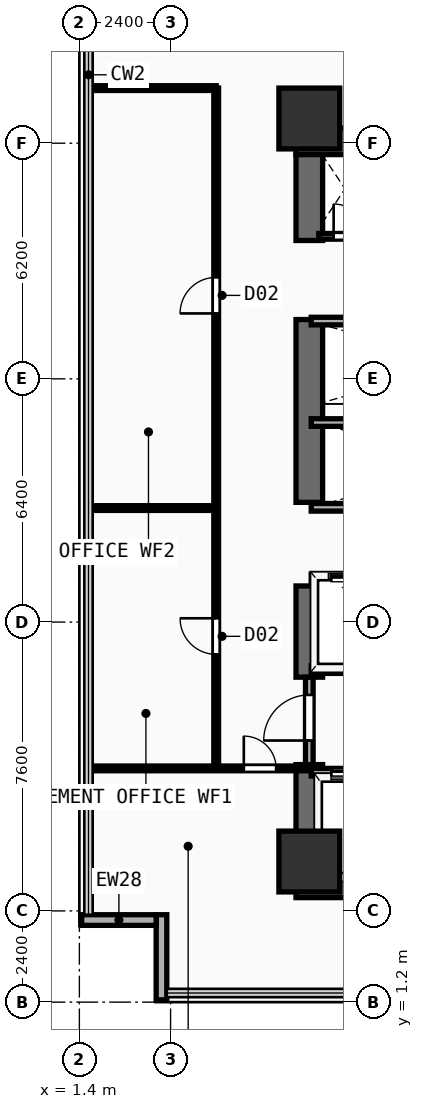
"""IFC4 building model, lengths in metres.
Left out: names, types, materials, properties, quantities, classifications, styles, units other than length and angle.
Written with IfcOpenShell. Run it as: python <this file> out.ifc"""

import sys

from ifc_helpers import new_model, si_unit, direction, frame, frame_2d, origin, origin_2d, place, context, subcontext, project, spatial, rectangle, extrude, element, fill, save


model = new_model("IFC4")
c1 = context("Model", 3, precision=1e-05, world=origin(), true_north=direction((0.0, 1.0)))
c2 = subcontext(c1, "Body", "Model", "MODEL_VIEW")
j1 = project(units=[si_unit("LENGTHUNIT", "METRE"), si_unit("PLANEANGLEUNIT", "RADIAN")], contexts=[c1])
p1 = place(None, origin())
s1 = spatial("IfcSite", under=j1, at=p1, CompositionType="ELEMENT")
p2 = place(p1, origin())
s2 = spatial("IfcBuilding", under=s1, at=p2, CompositionType="ELEMENT")
p3 = place(p2, frame((0.0, 0.0, 56.2)))
s3 = spatial("IfcBuildingStorey", under=s2, at=p3, CompositionType="ELEMENT", Elevation=56.2)
for number, where, z_axis, x_axis in (
    (1, (7.1, 4.3, 0.0), (0.0, 0.0, 1.0), (1.0, 0.0, 0.0)),
    (2, (7.1, 23.85, 0.0), (0.0, 0.0, 1.0), (1.0, 0.0, 0.0)),
):
    element("IfcWall", number, at=place(p3, frame(where, z_axis=z_axis, x_axis=x_axis)), inside=s3, PredefinedType="SHEAR", context=c2, shape_type="SweptSolid", body=[
        extrude(rectangle(XDim=14.05, YDim=0.7, at=frame_2d((7.025, 0.0))), origin(), (0.0, 0.0, 1.0), 3.54),
    ])
p4 = place(p3, frame((7.45, 4.65, 0.0), z_axis=(0.0, 0.0, 1.0), x_axis=(0.0, 1.0, 0.0)))
e3 = element("IfcWall", 3, at=p4, inside=s3, PredefinedType="SHEAR", context=c2, shape_type="SweptSolid", body=[
    extrude(rectangle(XDim=2.8, YDim=0.7, at=frame_2d((1.4, 0.0))), origin(), (0.0, 0.0, 1.0), 3.54),
])
p5 = place(p3, frame((7.45, 9.75, 0.0), z_axis=(0.0, 0.0, 1.0), x_axis=(0.0, 1.0, 0.0)))
e4 = element("IfcWall", 4, at=p5, inside=s3, PredefinedType="SHEAR", context=c2, shape_type="SweptSolid", body=[
    extrude(rectangle(XDim=2.4, YDim=0.7, at=frame_2d((1.2, 0.0))), origin(), (0.0, 0.0, 1.0), 3.54),
])
p6 = place(p3, frame((7.45, 14.35, 0.0), z_axis=(0.0, 0.0, 1.0), x_axis=(0.0, 1.0, 0.0)))
e5 = element("IfcWall", 5, at=p6, inside=s3, PredefinedType="SHEAR", context=c2, shape_type="SweptSolid", body=[
    extrude(rectangle(XDim=4.81, YDim=0.7, at=frame_2d((2.405, 0.0))), origin(), (0.0, 0.0, 1.0), 3.54),
])
p7 = place(p3, frame((7.45, 21.24, 0.0), z_axis=(0.0, 0.0, 1.0), x_axis=(0.0, 1.0, 0.0)))
e6 = element("IfcWall", 6, at=p7, inside=s3, PredefinedType="SHEAR", context=c2, shape_type="SweptSolid", body=[
    extrude(rectangle(XDim=2.26, YDim=0.7, at=frame_2d((1.13, 0.0))), origin(), (0.0, 0.0, 1.0), 3.54),
])
for number, where, z_axis, x_axis in (
    (7, (7.45, 4.9, 0.0), (0.0, 0.0, 1.0), (1.0, 0.0, 0.0)),
    (8, (7.45, 24.45, 0.0), (0.0, 0.0, 1.0), (1.0, 0.0, 0.0)),
):
    element("IfcColumn", number, at=place(p3, frame(where, z_axis=z_axis, x_axis=x_axis)), inside=s3, PredefinedType="COLUMN", context=c2, shape_type="SweptSolid", body=[
        extrude(rectangle(XDim=1.6, YDim=1.6, at=origin_2d()), origin(), (0.0, 0.0, 1.0), 3.54),
    ])
p8 = place(p3, frame((3.56, 1.26, 0.0), z_axis=(0.0, 0.0, 1.0), x_axis=(0.0, 1.0, 0.0)))
e9 = element("IfcWall", 9, at=p8, inside=s3, PredefinedType="SOLIDWALL", context=c2, shape_type="SweptSolid", body=[
    extrude(rectangle(XDim=2.24, YDim=0.28, at=frame_2d((1.12, 0.0))), origin(), (0.0, 0.0, 1.0), 3.54),
])
p9 = place(p3, frame((1.46, 3.36, 0.0), z_axis=(0.0, 0.0, 1.0), x_axis=(1.0, 0.0, 0.0)))
e10 = element("IfcWall", 10, at=p9, inside=s3, PredefinedType="SOLIDWALL", context=c2, shape_type="SweptSolid", body=[
    extrude(rectangle(XDim=1.96, YDim=0.28, at=frame_2d((0.98, 0.0))), origin(), (0.0, 0.0, 1.0), 3.54),
])
p10 = place(p3, frame((7.5, 7.25, 0.0), z_axis=(0.0, 0.0, 1.0), x_axis=(1.0, 0.0, 0.0)))
e11 = element("IfcWall", 11, at=p10, inside=s3, PredefinedType="PARTITIONING", context=c2, shape_type="SweptSolid", body=[
    extrude(rectangle(XDim=8.35, YDim=0.2, at=frame_2d((4.175, 0.0))), origin(), (0.0, 0.0, 1.0), 3.54),
])
p11 = place(p10, frame((0.53, 0.0, 0.0)))
e12 = element("IfcOpeningElement", 12, at=p11, cuts=e11, PredefinedType="OPENING", context=c2, shape_type="SweptSolid", body=[
    extrude(rectangle(XDim=1.1, YDim=2.2, at=frame_2d((0.55, 1.1))), frame((0.0, 0.11, 0.0), z_axis=(0.0, -1.0, 0.0), x_axis=(1.0, 0.0, 0.0)), (0.0, 0.0, 1.0), 0.22),
])
p12 = place(p10, frame((2.37, 0.0, 0.0)))
e13 = element("IfcOpeningElement", 13, at=p12, cuts=e11, PredefinedType="OPENING", context=c2, shape_type="SweptSolid", body=[
    extrude(rectangle(XDim=1.1, YDim=2.2, at=frame_2d((0.55, 1.1))), frame((0.0, 0.11, 0.0), z_axis=(0.0, -1.0, 0.0), x_axis=(1.0, 0.0, 0.0)), (0.0, 0.0, 1.0), 0.22),
])
p13 = place(p10, frame((4.33, 0.0, 0.0)))
e14 = element("IfcOpeningElement", 14, at=p13, cuts=e11, PredefinedType="OPENING", context=c2, shape_type="SweptSolid", body=[
    extrude(rectangle(XDim=1.1, YDim=2.2, at=frame_2d((0.55, 1.1))), frame((0.0, 0.11, 0.0), z_axis=(0.0, -1.0, 0.0), x_axis=(1.0, 0.0, 0.0)), (0.0, 0.0, 1.0), 0.22),
])
p14 = place(p10, frame((6.5, 0.0, 0.0)))
e15 = element("IfcOpeningElement", 15, at=p14, cuts=e11, PredefinedType="OPENING", context=c2, shape_type="SweptSolid", body=[
    extrude(rectangle(XDim=1.1, YDim=2.2, at=frame_2d((0.55, 1.1))), frame((0.0, 0.11, 0.0), z_axis=(0.0, -1.0, 0.0), x_axis=(1.0, 0.0, 0.0)), (0.0, 0.0, 1.0), 0.22),
])
p15 = place(p3, frame((7.5, 9.95, 0.0), z_axis=(0.0, 0.0, 1.0), x_axis=(1.0, 0.0, 0.0)))
e16 = element("IfcWall", 16, at=p15, inside=s3, PredefinedType="PARTITIONING", context=c2, shape_type="SweptSolid", body=[
    extrude(rectangle(XDim=8.35, YDim=0.2, at=frame_2d((4.175, 0.0))), origin(), (0.0, 0.0, 1.0), 3.54),
])
p16 = place(p3, frame((7.45, 7.45, 0.0), z_axis=(0.0, 0.0, 1.0), x_axis=(0.0, 1.0, 0.0)))
e17 = element("IfcWall", 17, at=p16, inside=s3, PredefinedType="PARTITIONING", context=c2, shape_type="SweptSolid", body=[
    extrude(rectangle(XDim=2.3, YDim=0.2, at=frame_2d((1.15, 0.0))), origin(), (0.0, 0.0, 1.0), 2.52),
])
p17 = place(p16, frame((0.633, 0.0, 0.0)))
e18 = element("IfcOpeningElement", 18, at=p17, cuts=e17, PredefinedType="OPENING", context=c2, shape_type="SweptSolid", body=[
    extrude(rectangle(XDim=1.2, YDim=2.25, at=frame_2d((0.6, 1.125))), frame((0.0, 0.11, 0.0), z_axis=(0.0, -1.0, 0.0), x_axis=(1.0, 0.0, 0.0)), (0.0, 0.0, 1.0), 0.22),
])
p18 = place(p3, frame((7.5, 12.36, 0.0), z_axis=(0.0, 0.0, 1.0), x_axis=(1.0, 0.0, 0.0)))
e19 = element("IfcWall", 19, at=p18, inside=s3, PredefinedType="PARTITIONING", context=c2, shape_type="SweptSolid", body=[
    extrude(rectangle(XDim=7.85, YDim=0.2, at=frame_2d((3.925, 0.0))), origin(), (0.0, 0.0, 1.0), 3.54),
])
p19 = place(p18, frame((0.53, 0.0, 0.0)))
e20 = element("IfcOpeningElement", 20, at=p19, cuts=e19, PredefinedType="OPENING", context=c2, shape_type="SweptSolid", body=[
    extrude(rectangle(XDim=1.1, YDim=2.2, at=frame_2d((0.55, 1.1))), frame((0.0, 0.11, 0.0), z_axis=(0.0, -1.0, 0.0), x_axis=(1.0, 0.0, 0.0)), (0.0, 0.0, 1.0), 0.22),
])
p20 = place(p18, frame((2.42, 0.0, 0.0)))
e21 = element("IfcOpeningElement", 21, at=p20, cuts=e19, PredefinedType="OPENING", context=c2, shape_type="SweptSolid", body=[
    extrude(rectangle(XDim=1.1, YDim=2.2, at=frame_2d((0.55, 1.1))), frame((0.0, 0.11, 0.0), z_axis=(0.0, -1.0, 0.0), x_axis=(1.0, 0.0, 0.0)), (0.0, 0.0, 1.0), 0.22),
])
p21 = place(p18, frame((4.31, 0.0, 0.0)))
e22 = element("IfcOpeningElement", 22, at=p21, cuts=e19, PredefinedType="OPENING", context=c2, shape_type="SweptSolid", body=[
    extrude(rectangle(XDim=1.1, YDim=2.2, at=frame_2d((0.55, 1.1))), frame((0.0, 0.11, 0.0), z_axis=(0.0, -1.0, 0.0), x_axis=(1.0, 0.0, 0.0)), (0.0, 0.0, 1.0), 0.22),
])
p22 = place(p18, frame((6.2, 0.0, 0.0)))
e23 = element("IfcOpeningElement", 23, at=p22, cuts=e19, PredefinedType="OPENING", context=c2, shape_type="SweptSolid", body=[
    extrude(rectangle(XDim=1.1, YDim=2.2, at=frame_2d((0.55, 1.1))), frame((0.0, 0.11, 0.0), z_axis=(0.0, -1.0, 0.0), x_axis=(1.0, 0.0, 0.0)), (0.0, 0.0, 1.0), 0.22),
])
for number, where, z_axis, x_axis in (
    (24, (7.5, 14.22, 0.0), (0.0, 0.0, 1.0), (1.0, 0.0, 0.0)),
    (25, (7.5, 16.45, 0.0), (0.0, 0.0, 1.0), (1.0, 0.0, 0.0)),
    (26, (7.5, 19.12, 0.0), (0.0, 0.0, 1.0), (1.0, 0.0, 0.0)),
):
    element("IfcWall", number, at=place(p3, frame(where, z_axis=z_axis, x_axis=x_axis)), inside=s3, PredefinedType="PARTITIONING", context=c2, shape_type="SweptSolid", body=[
        extrude(rectangle(XDim=7.85, YDim=0.2, at=frame_2d((3.925, 0.0))), origin(), (0.0, 0.0, 1.0), 3.54),
    ])
p23 = place(p3, frame((7.7, 21.35, 0.0), z_axis=(0.0, 0.0, 1.0), x_axis=(1.0, 0.0, 0.0)))
e27 = element("IfcWall", 27, at=p23, inside=s3, PredefinedType="PARTITIONING", context=c2, shape_type="SweptSolid", body=[
    extrude(rectangle(XDim=1.55, YDim=0.15, at=frame_2d((0.775, 0.0))), origin(), (0.0, 0.0, 1.0), 3.54),
])
p24 = place(p23, frame((0.39, 0.0, 0.0)))
e28 = element("IfcOpeningElement", 28, at=p24, cuts=e27, PredefinedType="OPENING", context=c2, shape_type="SweptSolid", body=[
    extrude(rectangle(XDim=0.85, YDim=2.15, at=frame_2d((0.425, 1.075))), frame((0.0, 0.085, 0.0), z_axis=(0.0, -1.0, 0.0), x_axis=(1.0, 0.0, 0.0)), (0.0, 0.0, 1.0), 0.17),
])
p25 = place(p3, frame((1.64, 7.35, 0.0), z_axis=(0.0, 0.0, 1.0), x_axis=(1.0, 0.0, 0.0)))
e29 = element("IfcWall", 29, at=p25, inside=s3, PredefinedType="PARTITIONING", context=c2, shape_type="SweptSolid", body=[
    extrude(rectangle(XDim=5.76, YDim=0.125, at=frame_2d((2.88, 0.0))), origin(), (0.0, 0.0, 1.0), 3.54),
])
p26 = place(p25, frame((4.087, 0.0, 0.0)))
e30 = element("IfcOpeningElement", 30, at=p26, cuts=e29, PredefinedType="OPENING", context=c2, shape_type="SweptSolid", body=[
    extrude(rectangle(XDim=0.85, YDim=2.15, at=frame_2d((0.425, 1.075))), frame((0.0, 0.073, 0.0), z_axis=(0.0, -1.0, 0.0), x_axis=(1.0, 0.0, 0.0)), (0.0, 0.0, 1.0), 0.145),
])
p27 = place(p3, frame((5.0, 7.5, 0.0), z_axis=(0.0, 0.0, 1.0), x_axis=(0.0, 1.0, 0.0)))
e31 = element("IfcWall", 31, at=p27, inside=s3, PredefinedType="PARTITIONING", context=c2, shape_type="SweptSolid", body=[
    extrude(rectangle(XDim=17.75, YDim=0.125, at=frame_2d((8.875, 0.0))), origin(), (0.0, 0.0, 1.0), 3.54),
])
p28 = place(p27, frame((2.85, 0.0, 0.0)))
e32 = element("IfcOpeningElement", 32, at=p28, cuts=e31, PredefinedType="OPENING", context=c2, shape_type="SweptSolid", body=[
    extrude(rectangle(XDim=0.95, YDim=2.15, at=frame_2d((0.475, 1.075))), frame((0.0, 0.073, 0.0), z_axis=(0.0, -1.0, 0.0), x_axis=(1.0, 0.0, 0.0)), (0.0, 0.0, 1.0), 0.145),
])
p29 = place(p27, frame((11.821, 0.0, 0.0)))
e33 = element("IfcOpeningElement", 33, at=p29, cuts=e31, PredefinedType="OPENING", context=c2, shape_type="SweptSolid", body=[
    extrude(rectangle(XDim=0.95, YDim=2.15, at=frame_2d((0.475, 1.075))), frame((0.0, 0.073, 0.0), z_axis=(0.0, -1.0, 0.0), x_axis=(1.0, 0.0, 0.0)), (0.0, 0.0, 1.0), 0.145),
])
for number, where, z_axis, x_axis in (
    (34, (1.64, 25.25, 0.0), (0.0, 0.0, 1.0), (1.0, 0.0, 0.0)),
    (35, (1.64, 14.2, 0.0), (0.0, 0.0, 1.0), (1.0, 0.0, 0.0)),
):
    element("IfcWall", number, at=place(p3, frame(where, z_axis=z_axis, x_axis=x_axis)), inside=s3, PredefinedType="PARTITIONING", context=c2, shape_type="SweptSolid", body=[
        extrude(rectangle(XDim=3.36, YDim=0.125, at=frame_2d((1.68, 0.0))), origin(), (0.0, 0.0, 1.0), 3.54),
    ])
p30 = place(p11, origin())
e36 = element("IfcDoor", 36, at=p30, inside=s3, OperationType="SLIDING_TO_LEFT", PredefinedType="DOOR", context=c2, shape_type="SweptSolid", body=[
    extrude(rectangle(XDim=1.1, YDim=2.2, at=frame_2d((0.55, 1.1))), frame((0.0, 0.025, 0.0), z_axis=(0.0, -1.0, 0.0), x_axis=(1.0, 0.0, 0.0)), (0.0, 0.0, 1.0), 0.05),
])
fill(e12, e36)
p31 = place(p17, frame((1.2, 0.0, 0.0), z_axis=(0.0, 0.0, 1.0), x_axis=(-1.0, 0.0, 0.0)))
e37 = element("IfcDoor", 37, at=p31, inside=s3, OperationType="SINGLE_SWING_RIGHT", PredefinedType="DOOR", context=c2, shape_type="SweptSolid", body=[
    extrude(rectangle(XDim=1.2, YDim=2.25, at=frame_2d((0.6, 1.125))), frame((0.0, 0.025, 0.0), z_axis=(0.0, -1.0, 0.0), x_axis=(1.0, 0.0, 0.0)), (0.0, 0.0, 1.0), 0.05),
])
fill(e18, e37)
p32 = place(p19, origin())
e38 = element("IfcDoor", 38, at=p32, inside=s3, OperationType="SLIDING_TO_LEFT", PredefinedType="DOOR", context=c2, shape_type="SweptSolid", body=[
    extrude(rectangle(XDim=1.1, YDim=2.2, at=frame_2d((0.55, 1.1))), frame((0.0, 0.025, 0.0), z_axis=(0.0, -1.0, 0.0), x_axis=(1.0, 0.0, 0.0)), (0.0, 0.0, 1.0), 0.05),
])
fill(e20, e38)
p33 = place(p24, origin())
e39 = element("IfcDoor", 39, at=p33, inside=s3, OperationType="SINGLE_SWING_LEFT", PredefinedType="DOOR", context=c2, shape_type="SweptSolid", body=[
    extrude(rectangle(XDim=0.85, YDim=2.15, at=frame_2d((0.425, 1.075))), frame((0.0, 0.025, 0.0), z_axis=(0.0, -1.0, 0.0), x_axis=(1.0, 0.0, 0.0)), (0.0, 0.0, 1.0), 0.05),
])
fill(e28, e39)
p34 = place(p26, origin())
e40 = element("IfcDoor", 40, at=p34, inside=s3, OperationType="SINGLE_SWING_LEFT", PredefinedType="DOOR", context=c2, shape_type="SweptSolid", body=[
    extrude(rectangle(XDim=0.85, YDim=2.15, at=frame_2d((0.425, 1.075))), frame((0.0, 0.025, 0.0), z_axis=(0.0, -1.0, 0.0), x_axis=(1.0, 0.0, 0.0)), (0.0, 0.0, 1.0), 0.05),
])
fill(e30, e40)
p35 = place(p28, origin())
e41 = element("IfcDoor", 41, at=p35, inside=s3, OperationType="SINGLE_SWING_RIGHT", PredefinedType="DOOR", context=c2, shape_type="SweptSolid", body=[
    extrude(rectangle(XDim=0.95, YDim=2.15, at=frame_2d((0.475, 1.075))), frame((0.0, 0.025, 0.0), z_axis=(0.0, -1.0, 0.0), x_axis=(1.0, 0.0, 0.0)), (0.0, 0.0, 1.0), 0.05),
])
fill(e32, e41)
p36 = place(p29, origin())
e42 = element("IfcDoor", 42, at=p36, inside=s3, OperationType="SINGLE_SWING_LEFT", PredefinedType="DOOR", context=c2, shape_type="SweptSolid", body=[
    extrude(rectangle(XDim=0.95, YDim=2.15, at=frame_2d((0.475, 1.075))), frame((0.0, 0.025, 0.0), z_axis=(0.0, -1.0, 0.0), x_axis=(1.0, 0.0, 0.0)), (0.0, 0.0, 1.0), 0.05),
])
fill(e33, e42)
save(model, sys.argv[1])
